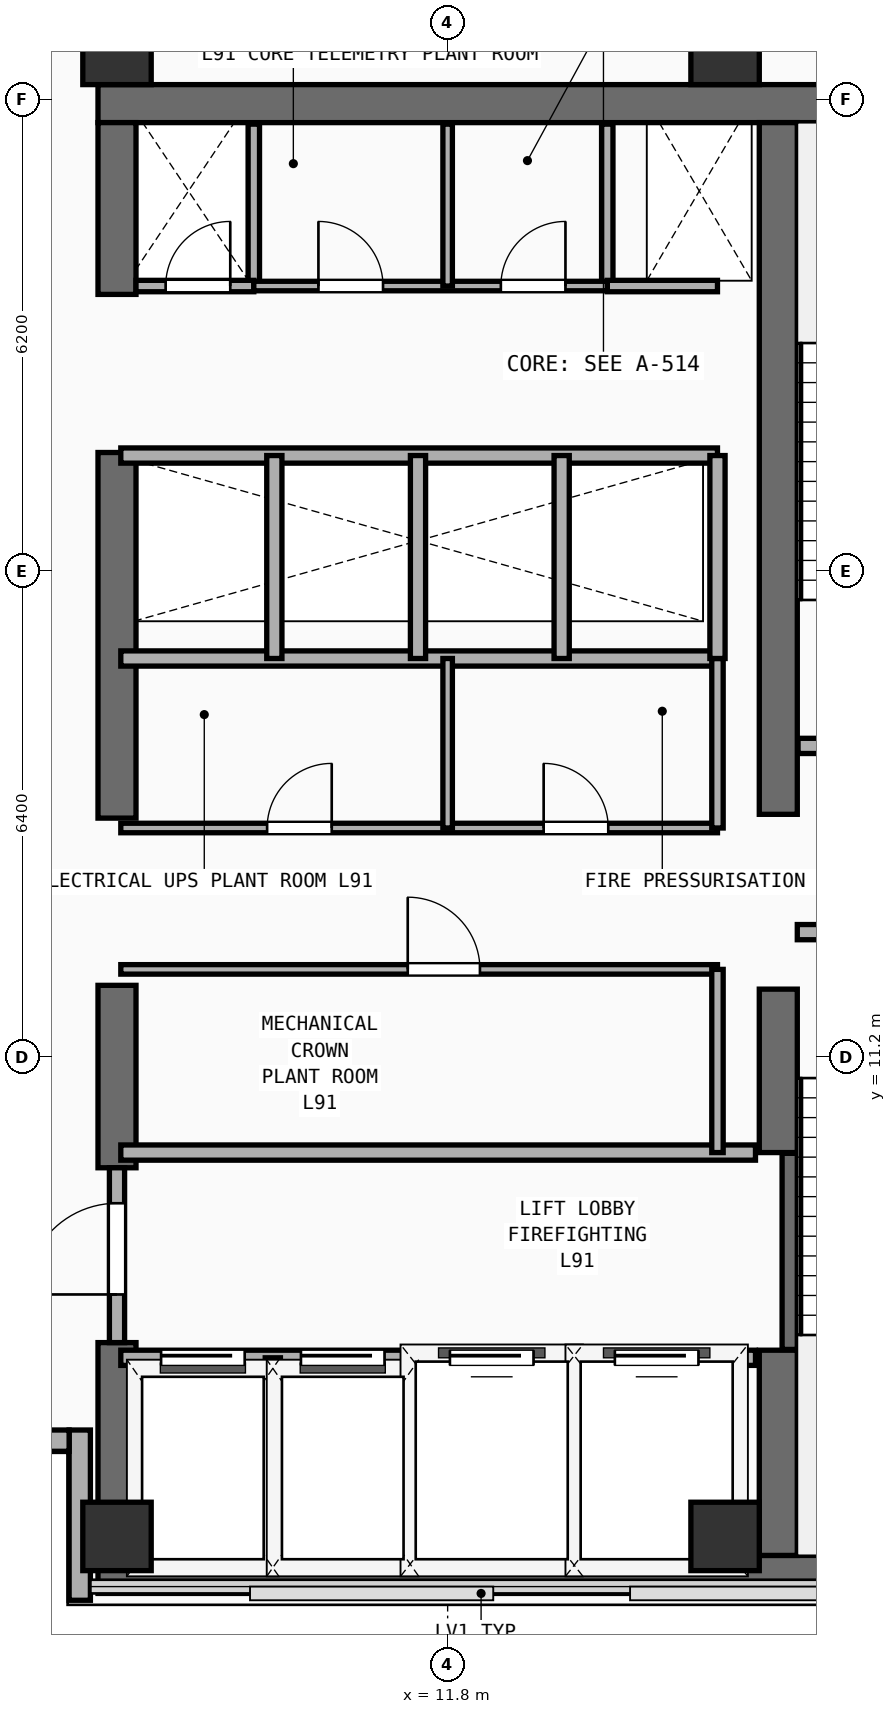
"""IFC4 building model, lengths in metres.
Left out: names, types, materials, properties, quantities, classifications, styles, units other than length and angle.
Written with IfcOpenShell. Run it as: python <this file> out.ifc"""

import sys

from ifc_helpers import new_model, si_unit, direction, frame, frame_2d, origin, origin_2d, place, context, subcontext, project, spatial, rectangle, extrude, element, fill, save


model = new_model("IFC4")
c1 = context("Model", 3, precision=1e-05, world=origin(), true_north=direction((0.0, 1.0)))
c2 = subcontext(c1, "Body", "Model", "MODEL_VIEW")
j1 = project(units=[si_unit("LENGTHUNIT", "METRE"), si_unit("PLANEANGLEUNIT", "RADIAN")], contexts=[c1])
p1 = place(None, origin())
s1 = spatial("IfcSite", under=j1, at=p1, CompositionType="ELEMENT")
p2 = place(p1, origin())
s2 = spatial("IfcBuilding", under=s1, at=p2, CompositionType="ELEMENT")
p3 = place(p2, frame((0.0, 0.0, 356.2)))
s3 = spatial("IfcBuildingStorey", under=s2, at=p3, CompositionType="ELEMENT", Elevation=356.2)
for number, where, z_axis, x_axis in (
    (1, (7.2, 4.4, 0.0), (0.0, 0.0, 1.0), (1.0, 0.0, 0.0)),
    (2, (7.2, 23.75, 0.0), (0.0, 0.0, 1.0), (1.0, 0.0, 0.0)),
):
    element("IfcWall", number, at=place(p3, frame(where, z_axis=z_axis, x_axis=x_axis)), inside=s3, PredefinedType="SHEAR", context=c2, shape_type="SweptSolid", body=[
        extrude(rectangle(XDim=13.85, YDim=0.5, at=frame_2d((6.925, 0.0))), origin(), (0.0, 0.0, 1.0), 3.82),
    ])
p4 = place(p3, frame((7.45, 4.65, 0.0), z_axis=(0.0, 0.0, 1.0), x_axis=(0.0, 1.0, 0.0)))
e3 = element("IfcWall", 3, at=p4, inside=s3, PredefinedType="SHEAR", context=c2, shape_type="SweptSolid", body=[
    extrude(rectangle(XDim=2.8, YDim=0.5, at=frame_2d((1.4, 0.0))), origin(), (0.0, 0.0, 1.0), 3.82),
])
p5 = place(p3, frame((7.45, 9.75, 0.0), z_axis=(0.0, 0.0, 1.0), x_axis=(0.0, 1.0, 0.0)))
e4 = element("IfcWall", 4, at=p5, inside=s3, PredefinedType="SHEAR", context=c2, shape_type="SweptSolid", body=[
    extrude(rectangle(XDim=2.4, YDim=0.5, at=frame_2d((1.2, 0.0))), origin(), (0.0, 0.0, 1.0), 3.82),
])
p6 = place(p3, frame((7.45, 14.35, 0.0), z_axis=(0.0, 0.0, 1.0), x_axis=(0.0, 1.0, 0.0)))
e5 = element("IfcWall", 5, at=p6, inside=s3, PredefinedType="SHEAR", context=c2, shape_type="SweptSolid", body=[
    extrude(rectangle(XDim=4.81, YDim=0.5, at=frame_2d((2.405, 0.0))), origin(), (0.0, 0.0, 1.0), 3.82),
])
p7 = place(p3, frame((7.45, 21.24, 0.0), z_axis=(0.0, 0.0, 1.0), x_axis=(0.0, 1.0, 0.0)))
e6 = element("IfcWall", 6, at=p7, inside=s3, PredefinedType="SHEAR", context=c2, shape_type="SweptSolid", body=[
    extrude(rectangle(XDim=2.26, YDim=0.5, at=frame_2d((1.13, 0.0))), origin(), (0.0, 0.0, 1.0), 3.82),
])
p8 = place(p3, frame((16.15, 4.65, 0.0), z_axis=(0.0, 0.0, 1.0), x_axis=(0.0, 1.0, 0.0)))
e7 = element("IfcWall", 7, at=p8, inside=s3, PredefinedType="SHEAR", context=c2, shape_type="SweptSolid", body=[
    extrude(rectangle(XDim=2.7, YDim=0.5, at=frame_2d((1.35, 0.0))), origin(), (0.0, 0.0, 1.0), 3.82),
])
p9 = place(p3, frame((16.15, 9.95, 0.0), z_axis=(0.0, 0.0, 1.0), x_axis=(0.0, 1.0, 0.0)))
e8 = element("IfcWall", 8, at=p9, inside=s3, PredefinedType="SHEAR", context=c2, shape_type="SweptSolid", body=[
    extrude(rectangle(XDim=2.15, YDim=0.5, at=frame_2d((1.075, 0.0))), origin(), (0.0, 0.0, 1.0), 3.82),
])
p10 = place(p3, frame((16.15, 14.4, 0.0), z_axis=(0.0, 0.0, 1.0), x_axis=(0.0, 1.0, 0.0)))
e9 = element("IfcWall", 9, at=p10, inside=s3, PredefinedType="SHEAR", context=c2, shape_type="SweptSolid", body=[
    extrude(rectangle(XDim=9.1, YDim=0.5, at=frame_2d((4.55, 0.0))), origin(), (0.0, 0.0, 1.0), 3.82),
])
for number, where, z_axis, x_axis in (
    (10, (7.45, 4.9, 0.0), (0.0, 0.0, 1.0), (1.0, 0.0, 0.0)),
    (11, (15.45, 4.9, 0.0), (0.0, 0.0, 1.0), (1.0, 0.0, 0.0)),
    (12, (7.45, 24.45, 0.0), (0.0, 0.0, 1.0), (1.0, 0.0, 0.0)),
    (13, (15.45, 24.45, 0.0), (0.0, 0.0, 1.0), (1.0, 0.0, 0.0)),
):
    element("IfcColumn", number, at=place(p3, frame(where, z_axis=z_axis, x_axis=x_axis)), inside=s3, PredefinedType="COLUMN", context=c2, shape_type="SweptSolid", body=[
        extrude(rectangle(XDim=0.9, YDim=0.9, at=origin_2d()), origin(), (0.0, 0.0, 1.0), 3.82),
    ])
p11 = place(p3, frame((6.96, 4.06, 0.0), z_axis=(0.0, 0.0, 1.0), x_axis=(0.0, 1.0, 0.0)))
e14 = element("IfcWall", 14, at=p11, inside=s3, PredefinedType="SOLIDWALL", context=c2, shape_type="SweptSolid", body=[
    extrude(rectangle(XDim=2.24, YDim=0.28, at=frame_2d((1.12, 0.0))), origin(), (0.0, 0.0, 1.0), 3.82),
])
p12 = place(p3, frame((4.86, 6.16, 0.0), z_axis=(0.0, 0.0, 1.0), x_axis=(1.0, 0.0, 0.0)))
e15 = element("IfcWall", 15, at=p12, inside=s3, PredefinedType="SOLIDWALL", context=c2, shape_type="SweptSolid", body=[
    extrude(rectangle(XDim=1.96, YDim=0.28, at=frame_2d((0.98, 0.0))), origin(), (0.0, 0.0, 1.0), 3.82),
])
p13 = place(p3, frame((16.3, 7.36, 0.0), z_axis=(0.0, 0.0, 1.0), x_axis=(0.0, 1.0, 0.0)))
e16 = element("IfcWall", 16, at=p13, inside=s3, PredefinedType="SHEAR", context=c2, shape_type="SweptSolid", body=[
    extrude(rectangle(XDim=2.58, YDim=0.2, at=frame_2d((1.29, 0.0))), origin(), (0.0, 0.0, 1.0), 3.82),
])
p14 = place(p3, frame((16.4, 12.85, 0.0), z_axis=(0.0, 0.0, 1.0), x_axis=(1.0, 0.0, 0.0)))
e17 = element("IfcWall", 17, at=p14, inside=s3, PredefinedType="PARTITIONING", context=c2, shape_type="SweptSolid", body=[
    extrude(rectangle(XDim=3.96, YDim=0.2, at=frame_2d((1.98, 0.0))), origin(), (0.0, 0.0, 1.0), 3.82),
])
p15 = place(p14, frame((1.304, 0.0, 0.0)))
e18 = element("IfcOpeningElement", 18, at=p15, cuts=e17, PredefinedType="OPENING", context=c2, shape_type="SweptSolid", body=[
    extrude(rectangle(XDim=1.1, YDim=2.2, at=frame_2d((0.55, 1.1))), frame((0.0, 0.11, 0.0), z_axis=(0.0, -1.0, 0.0), x_axis=(1.0, 0.0, 0.0)), (0.0, 0.0, 1.0), 0.22),
])
p16 = place(p3, frame((16.41, 15.3, 0.0), z_axis=(0.0, 0.0, 1.0), x_axis=(1.0, 0.0, 0.0)))
e19 = element("IfcWall", 19, at=p16, inside=s3, PredefinedType="PARTITIONING", context=c2, shape_type="SweptSolid", body=[
    extrude(rectangle(XDim=3.95, YDim=0.2, at=frame_2d((1.975, 0.0))), origin(), (0.0, 0.0, 1.0), 3.82),
])
p17 = place(p16, frame((1.294, 0.0, 0.0)))
e20 = element("IfcOpeningElement", 20, at=p17, cuts=e19, PredefinedType="OPENING", context=c2, shape_type="SweptSolid", body=[
    extrude(rectangle(XDim=1.1, YDim=2.2, at=frame_2d((0.55, 1.1))), frame((0.0, 0.11, 0.0), z_axis=(0.0, -1.0, 0.0), x_axis=(1.0, 0.0, 0.0)), (0.0, 0.0, 1.0), 0.22),
])
p18 = place(p3, frame((7.5, 7.25, 0.0), z_axis=(0.0, 0.0, 1.0), x_axis=(1.0, 0.0, 0.0)))
e21 = element("IfcWall", 21, at=p18, inside=s3, PredefinedType="PARTITIONING", context=c2, shape_type="SweptSolid", body=[
    extrude(rectangle(XDim=8.35, YDim=0.2, at=frame_2d((4.175, 0.0))), origin(), (0.0, 0.0, 1.0), 3.82),
])
p19 = place(p18, frame((0.53, 0.0, 0.0)))
e22 = element("IfcOpeningElement", 22, at=p19, cuts=e21, PredefinedType="OPENING", context=c2, shape_type="SweptSolid", body=[
    extrude(rectangle(XDim=1.1, YDim=2.2, at=frame_2d((0.55, 1.1))), frame((0.0, 0.11, 0.0), z_axis=(0.0, -1.0, 0.0), x_axis=(1.0, 0.0, 0.0)), (0.0, 0.0, 1.0), 0.22),
])
p20 = place(p18, frame((2.37, 0.0, 0.0)))
e23 = element("IfcOpeningElement", 23, at=p20, cuts=e21, PredefinedType="OPENING", context=c2, shape_type="SweptSolid", body=[
    extrude(rectangle(XDim=1.1, YDim=2.2, at=frame_2d((0.55, 1.1))), frame((0.0, 0.11, 0.0), z_axis=(0.0, -1.0, 0.0), x_axis=(1.0, 0.0, 0.0)), (0.0, 0.0, 1.0), 0.22),
])
p21 = place(p18, frame((4.33, 0.0, 0.0)))
e24 = element("IfcOpeningElement", 24, at=p21, cuts=e21, PredefinedType="OPENING", context=c2, shape_type="SweptSolid", body=[
    extrude(rectangle(XDim=1.1, YDim=2.2, at=frame_2d((0.55, 1.1))), frame((0.0, 0.11, 0.0), z_axis=(0.0, -1.0, 0.0), x_axis=(1.0, 0.0, 0.0)), (0.0, 0.0, 1.0), 0.22),
])
p22 = place(p18, frame((6.5, 0.0, 0.0)))
e25 = element("IfcOpeningElement", 25, at=p22, cuts=e21, PredefinedType="OPENING", context=c2, shape_type="SweptSolid", body=[
    extrude(rectangle(XDim=1.1, YDim=2.2, at=frame_2d((0.55, 1.1))), frame((0.0, 0.11, 0.0), z_axis=(0.0, -1.0, 0.0), x_axis=(1.0, 0.0, 0.0)), (0.0, 0.0, 1.0), 0.22),
])
p23 = place(p3, frame((7.5, 9.95, 0.0), z_axis=(0.0, 0.0, 1.0), x_axis=(1.0, 0.0, 0.0)))
e26 = element("IfcWall", 26, at=p23, inside=s3, PredefinedType="PARTITIONING", context=c2, shape_type="SweptSolid", body=[
    extrude(rectangle(XDim=8.35, YDim=0.2, at=frame_2d((4.175, 0.0))), origin(), (0.0, 0.0, 1.0), 3.82),
])
for number, where, z_axis, x_axis in (
    (27, (9.5, 4.45, 0.0), (0.0, 0.0, 1.0), (0.0, 1.0, 0.0)),
    (28, (11.36, 4.45, 0.0), (0.0, 0.0, 1.0), (0.0, 1.0, 0.0)),
    (29, (13.46, 4.45, 0.0), (0.0, 0.0, 1.0), (0.0, 1.0, 0.0)),
):
    element("IfcWall", number, at=place(p3, frame(where, z_axis=z_axis, x_axis=x_axis)), inside=s3, PredefinedType="PARTITIONING", context=c2, shape_type="SweptSolid", body=[
        extrude(rectangle(XDim=2.8, YDim=0.2, at=frame_2d((1.4, 0.0))), origin(), (0.0, 0.0, 1.0), 3.82),
    ])
p24 = place(p3, frame((7.45, 7.45, 0.0), z_axis=(0.0, 0.0, 1.0), x_axis=(0.0, 1.0, 0.0)))
e30 = element("IfcWall", 30, at=p24, inside=s3, PredefinedType="PARTITIONING", context=c2, shape_type="SweptSolid", body=[
    extrude(rectangle(XDim=2.3, YDim=0.2, at=frame_2d((1.15, 0.0))), origin(), (0.0, 0.0, 1.0), 2.8),
])
p25 = place(p24, frame((0.633, 0.0, 0.0)))
e31 = element("IfcOpeningElement", 31, at=p25, cuts=e30, PredefinedType="OPENING", context=c2, shape_type="SweptSolid", body=[
    extrude(rectangle(XDim=1.2, YDim=2.25, at=frame_2d((0.6, 1.125))), frame((0.0, 0.11, 0.0), z_axis=(0.0, -1.0, 0.0), x_axis=(1.0, 0.0, 0.0)), (0.0, 0.0, 1.0), 0.22),
])
p26 = place(p3, frame((7.5, 16.45, 0.0), z_axis=(0.0, 0.0, 1.0), x_axis=(1.0, 0.0, 0.0)))
e32 = element("IfcWall", 32, at=p26, inside=s3, PredefinedType="PARTITIONING", context=c2, shape_type="SweptSolid", body=[
    extrude(rectangle(XDim=7.85, YDim=0.2, at=frame_2d((3.925, 0.0))), origin(), (0.0, 0.0, 1.0), 3.82),
])
p27 = place(p3, frame((7.5, 12.36, 0.0), z_axis=(0.0, 0.0, 1.0), x_axis=(1.0, 0.0, 0.0)))
e33 = element("IfcWall", 33, at=p27, inside=s3, PredefinedType="PARTITIONING", context=c2, shape_type="SweptSolid", body=[
    extrude(rectangle(XDim=7.85, YDim=0.125, at=frame_2d((3.925, 0.0))), origin(), (0.0, 0.0, 1.0), 3.82),
])
p28 = place(p27, frame((3.775, 0.0, 0.0)))
e34 = element("IfcOpeningElement", 34, at=p28, cuts=e33, PredefinedType="OPENING", context=c2, shape_type="SweptSolid", body=[
    extrude(rectangle(XDim=0.95, YDim=2.15, at=frame_2d((0.475, 1.075))), frame((0.0, 0.073, 0.0), z_axis=(0.0, -1.0, 0.0), x_axis=(1.0, 0.0, 0.0)), (0.0, 0.0, 1.0), 0.145),
])
p29 = place(p3, frame((7.5, 14.22, 0.0), z_axis=(0.0, 0.0, 1.0), x_axis=(1.0, 0.0, 0.0)))
e35 = element("IfcWall", 35, at=p29, inside=s3, PredefinedType="PARTITIONING", context=c2, shape_type="SweptSolid", body=[
    extrude(rectangle(XDim=7.85, YDim=0.125, at=frame_2d((3.925, 0.0))), origin(), (0.0, 0.0, 1.0), 3.82),
])
p30 = place(p29, frame((1.925, 0.0, 0.0)))
e36 = element("IfcOpeningElement", 36, at=p30, cuts=e35, PredefinedType="OPENING", context=c2, shape_type="SweptSolid", body=[
    extrude(rectangle(XDim=0.85, YDim=2.15, at=frame_2d((0.425, 1.075))), frame((0.0, 0.073, 0.0), z_axis=(0.0, -1.0, 0.0), x_axis=(1.0, 0.0, 0.0)), (0.0, 0.0, 1.0), 0.145),
])
p31 = place(p29, frame((5.563, 0.0, 0.0)))
e37 = element("IfcOpeningElement", 37, at=p31, cuts=e35, PredefinedType="OPENING", context=c2, shape_type="SweptSolid", body=[
    extrude(rectangle(XDim=0.85, YDim=2.15, at=frame_2d((0.425, 1.075))), frame((0.0, 0.073, 0.0), z_axis=(0.0, -1.0, 0.0), x_axis=(1.0, 0.0, 0.0)), (0.0, 0.0, 1.0), 0.145),
])
p32 = place(p3, frame((15.35, 9.95, 0.0), z_axis=(0.0, 0.0, 1.0), x_axis=(0.0, 1.0, 0.0)))
e38 = element("IfcWall", 38, at=p32, inside=s3, PredefinedType="PARTITIONING", context=c2, shape_type="SweptSolid", body=[
    extrude(rectangle(XDim=2.41, YDim=0.15, at=frame_2d((1.205, 0.0))), origin(), (0.0, 0.0, 1.0), 3.82),
])
p33 = place(p3, frame((15.35, 14.22, 0.0), z_axis=(0.0, 0.0, 1.0), x_axis=(0.0, 1.0, 0.0)))
e39 = element("IfcWall", 39, at=p33, inside=s3, PredefinedType="PARTITIONING", context=c2, shape_type="SweptSolid", body=[
    extrude(rectangle(XDim=2.23, YDim=0.15, at=frame_2d((1.115, 0.0))), origin(), (0.0, 0.0, 1.0), 3.82),
])
p34 = place(p3, frame((11.8, 14.22, 0.0), z_axis=(0.0, 0.0, 1.0), x_axis=(0.0, 1.0, 0.0)))
e40 = element("IfcWall", 40, at=p34, inside=s3, PredefinedType="PARTITIONING", context=c2, shape_type="SweptSolid", body=[
    extrude(rectangle(XDim=2.23, YDim=0.125, at=frame_2d((1.115, 0.0))), origin(), (0.0, 0.0, 1.0), 3.82),
])
p35 = place(p3, frame((7.5, 19.12, 0.0), z_axis=(0.0, 0.0, 1.0), x_axis=(1.0, 0.0, 0.0)))
e41 = element("IfcWall", 41, at=p35, inside=s3, PredefinedType="PARTITIONING", context=c2, shape_type="SweptSolid", body=[
    extrude(rectangle(XDim=7.85, YDim=0.2, at=frame_2d((3.925, 0.0))), origin(), (0.0, 0.0, 1.0), 3.82),
])
for number, where, z_axis, x_axis in (
    (42, (15.35, 16.45, 0.0), (0.0, 0.0, 1.0), (0.0, 1.0, 0.0)),
    (43, (9.52, 16.45, 0.0), (0.0, 0.0, 1.0), (0.0, 1.0, 0.0)),
    (44, (11.41, 16.45, 0.0), (0.0, 0.0, 1.0), (0.0, 1.0, 0.0)),
    (45, (13.3, 16.45, 0.0), (0.0, 0.0, 1.0), (0.0, 1.0, 0.0)),
):
    element("IfcWall", number, at=place(p3, frame(where, z_axis=z_axis, x_axis=x_axis)), inside=s3, PredefinedType="PARTITIONING", context=c2, shape_type="SweptSolid", body=[
        extrude(rectangle(XDim=2.67, YDim=0.2, at=frame_2d((1.335, 0.0))), origin(), (0.0, 0.0, 1.0), 3.82),
    ])
for number, where, z_axis, x_axis in (
    (46, (9.25, 21.35, 0.0), (0.0, 0.0, 1.0), (0.0, 1.0, 0.0)),
    (47, (13.9, 21.35, 0.0), (0.0, 0.0, 1.0), (0.0, 1.0, 0.0)),
):
    element("IfcWall", number, at=place(p3, frame(where, z_axis=z_axis, x_axis=x_axis)), inside=s3, PredefinedType="PARTITIONING", context=c2, shape_type="SweptSolid", body=[
        extrude(rectangle(XDim=2.13, YDim=0.15, at=frame_2d((1.065, 0.0))), origin(), (0.0, 0.0, 1.0), 3.82),
    ])
p36 = place(p3, frame((7.7, 21.35, 0.0), z_axis=(0.0, 0.0, 1.0), x_axis=(1.0, 0.0, 0.0)))
e48 = element("IfcWall", 48, at=p36, inside=s3, PredefinedType="PARTITIONING", context=c2, shape_type="SweptSolid", body=[
    extrude(rectangle(XDim=1.55, YDim=0.15, at=frame_2d((0.775, 0.0))), origin(), (0.0, 0.0, 1.0), 3.82),
])
p37 = place(p36, frame((0.39, 0.0, 0.0)))
e49 = element("IfcOpeningElement", 49, at=p37, cuts=e48, PredefinedType="OPENING", context=c2, shape_type="SweptSolid", body=[
    extrude(rectangle(XDim=0.85, YDim=2.15, at=frame_2d((0.425, 1.075))), frame((0.0, 0.085, 0.0), z_axis=(0.0, -1.0, 0.0), x_axis=(1.0, 0.0, 0.0)), (0.0, 0.0, 1.0), 0.17),
])
p38 = place(p3, frame((13.9, 21.35, 0.0), z_axis=(0.0, 0.0, 1.0), x_axis=(1.0, 0.0, 0.0)))
e50 = element("IfcWall", 50, at=p38, inside=s3, PredefinedType="PARTITIONING", context=c2, shape_type="SweptSolid", body=[
    extrude(rectangle(XDim=1.45, YDim=0.15, at=frame_2d((0.725, 0.0))), origin(), (0.0, 0.0, 1.0), 3.82),
])
p39 = place(p3, frame((9.25, 21.35, 0.0), z_axis=(0.0, 0.0, 1.0), x_axis=(1.0, 0.0, 0.0)))
e51 = element("IfcWall", 51, at=p39, inside=s3, PredefinedType="PARTITIONING", context=c2, shape_type="SweptSolid", body=[
    extrude(rectangle(XDim=4.65, YDim=0.125, at=frame_2d((2.325, 0.0))), origin(), (0.0, 0.0, 1.0), 3.82),
])
p40 = place(p39, frame((0.85, 0.0, 0.0)))
e52 = element("IfcOpeningElement", 52, at=p40, cuts=e51, PredefinedType="OPENING", context=c2, shape_type="SweptSolid", body=[
    extrude(rectangle(XDim=0.85, YDim=2.15, at=frame_2d((0.425, 1.075))), frame((0.0, 0.073, 0.0), z_axis=(0.0, -1.0, 0.0), x_axis=(1.0, 0.0, 0.0)), (0.0, 0.0, 1.0), 0.145),
])
p41 = place(p39, frame((3.25, 0.0, 0.0)))
e53 = element("IfcOpeningElement", 53, at=p41, cuts=e51, PredefinedType="OPENING", context=c2, shape_type="SweptSolid", body=[
    extrude(rectangle(XDim=0.85, YDim=2.15, at=frame_2d((0.425, 1.075))), frame((0.0, 0.073, 0.0), z_axis=(0.0, -1.0, 0.0), x_axis=(1.0, 0.0, 0.0)), (0.0, 0.0, 1.0), 0.145),
])
p42 = place(p3, frame((11.8, 21.35, 0.0), z_axis=(0.0, 0.0, 1.0), x_axis=(0.0, 1.0, 0.0)))
e54 = element("IfcWall", 54, at=p42, inside=s3, PredefinedType="PARTITIONING", context=c2, shape_type="SweptSolid", body=[
    extrude(rectangle(XDim=2.13, YDim=0.125, at=frame_2d((1.065, 0.0))), origin(), (0.0, 0.0, 1.0), 3.82),
])
p43 = place(p19, origin())
e55 = element("IfcDoor", 55, at=p43, inside=s3, OperationType="SLIDING_TO_LEFT", PredefinedType="DOOR", context=c2, shape_type="SweptSolid", body=[
    extrude(rectangle(XDim=1.1, YDim=2.2, at=frame_2d((0.55, 1.1))), frame((0.0, 0.025, 0.0), z_axis=(0.0, -1.0, 0.0), x_axis=(1.0, 0.0, 0.0)), (0.0, 0.0, 1.0), 0.05),
])
fill(e22, e55)
p44 = place(p20, origin())
e56 = element("IfcDoor", 56, at=p44, inside=s3, OperationType="SLIDING_TO_LEFT", PredefinedType="DOOR", context=c2, shape_type="SweptSolid", body=[
    extrude(rectangle(XDim=1.1, YDim=2.2, at=frame_2d((0.55, 1.1))), frame((0.0, 0.025, 0.0), z_axis=(0.0, -1.0, 0.0), x_axis=(1.0, 0.0, 0.0)), (0.0, 0.0, 1.0), 0.05),
])
fill(e23, e56)
p45 = place(p21, origin())
e57 = element("IfcDoor", 57, at=p45, inside=s3, OperationType="SLIDING_TO_LEFT", PredefinedType="DOOR", context=c2, shape_type="SweptSolid", body=[
    extrude(rectangle(XDim=1.1, YDim=2.2, at=frame_2d((0.55, 1.1))), frame((0.0, 0.025, 0.0), z_axis=(0.0, -1.0, 0.0), x_axis=(1.0, 0.0, 0.0)), (0.0, 0.0, 1.0), 0.05),
])
fill(e24, e57)
p46 = place(p22, origin())
e58 = element("IfcDoor", 58, at=p46, inside=s3, OperationType="SLIDING_TO_LEFT", PredefinedType="DOOR", context=c2, shape_type="SweptSolid", body=[
    extrude(rectangle(XDim=1.1, YDim=2.2, at=frame_2d((0.55, 1.1))), frame((0.0, 0.025, 0.0), z_axis=(0.0, -1.0, 0.0), x_axis=(1.0, 0.0, 0.0)), (0.0, 0.0, 1.0), 0.05),
])
fill(e25, e58)
p47 = place(p25, frame((1.2, 0.0, 0.0), z_axis=(0.0, 0.0, 1.0), x_axis=(-1.0, 0.0, 0.0)))
e59 = element("IfcDoor", 59, at=p47, inside=s3, OperationType="SINGLE_SWING_RIGHT", PredefinedType="DOOR", context=c2, shape_type="SweptSolid", body=[
    extrude(rectangle(XDim=1.2, YDim=2.25, at=frame_2d((0.6, 1.125))), frame((0.0, 0.025, 0.0), z_axis=(0.0, -1.0, 0.0), x_axis=(1.0, 0.0, 0.0)), (0.0, 0.0, 1.0), 0.05),
])
fill(e31, e59)
p48 = place(p28, origin())
e60 = element("IfcDoor", 60, at=p48, inside=s3, OperationType="SINGLE_SWING_LEFT", PredefinedType="DOOR", context=c2, shape_type="SweptSolid", body=[
    extrude(rectangle(XDim=0.95, YDim=2.15, at=frame_2d((0.475, 1.075))), frame((0.0, 0.025, 0.0), z_axis=(0.0, -1.0, 0.0), x_axis=(1.0, 0.0, 0.0)), (0.0, 0.0, 1.0), 0.05),
])
fill(e34, e60)
p49 = place(p30, origin())
e61 = element("IfcDoor", 61, at=p49, inside=s3, OperationType="SINGLE_SWING_RIGHT", PredefinedType="DOOR", context=c2, shape_type="SweptSolid", body=[
    extrude(rectangle(XDim=0.85, YDim=2.15, at=frame_2d((0.425, 1.075))), frame((0.0, 0.025, 0.0), z_axis=(0.0, -1.0, 0.0), x_axis=(1.0, 0.0, 0.0)), (0.0, 0.0, 1.0), 0.05),
])
fill(e36, e61)
p50 = place(p31, origin())
e62 = element("IfcDoor", 62, at=p50, inside=s3, OperationType="SINGLE_SWING_LEFT", PredefinedType="DOOR", context=c2, shape_type="SweptSolid", body=[
    extrude(rectangle(XDim=0.85, YDim=2.15, at=frame_2d((0.425, 1.075))), frame((0.0, 0.025, 0.0), z_axis=(0.0, -1.0, 0.0), x_axis=(1.0, 0.0, 0.0)), (0.0, 0.0, 1.0), 0.05),
])
fill(e37, e62)
p51 = place(p37, origin())
e63 = element("IfcDoor", 63, at=p51, inside=s3, OperationType="SINGLE_SWING_RIGHT", PredefinedType="DOOR", context=c2, shape_type="SweptSolid", body=[
    extrude(rectangle(XDim=0.85, YDim=2.15, at=frame_2d((0.425, 1.075))), frame((0.0, 0.025, 0.0), z_axis=(0.0, -1.0, 0.0), x_axis=(1.0, 0.0, 0.0)), (0.0, 0.0, 1.0), 0.05),
])
fill(e49, e63)
p52 = place(p40, origin())
e64 = element("IfcDoor", 64, at=p52, inside=s3, OperationType="SINGLE_SWING_LEFT", PredefinedType="DOOR", context=c2, shape_type="SweptSolid", body=[
    extrude(rectangle(XDim=0.85, YDim=2.15, at=frame_2d((0.425, 1.075))), frame((0.0, 0.025, 0.0), z_axis=(0.0, -1.0, 0.0), x_axis=(1.0, 0.0, 0.0)), (0.0, 0.0, 1.0), 0.05),
])
fill(e52, e64)
p53 = place(p41, origin())
e65 = element("IfcDoor", 65, at=p53, inside=s3, OperationType="SINGLE_SWING_RIGHT", PredefinedType="DOOR", context=c2, shape_type="SweptSolid", body=[
    extrude(rectangle(XDim=0.85, YDim=2.15, at=frame_2d((0.425, 1.075))), frame((0.0, 0.025, 0.0), z_axis=(0.0, -1.0, 0.0), x_axis=(1.0, 0.0, 0.0)), (0.0, 0.0, 1.0), 0.05),
])
fill(e53, e65)
save(model, sys.argv[1])
